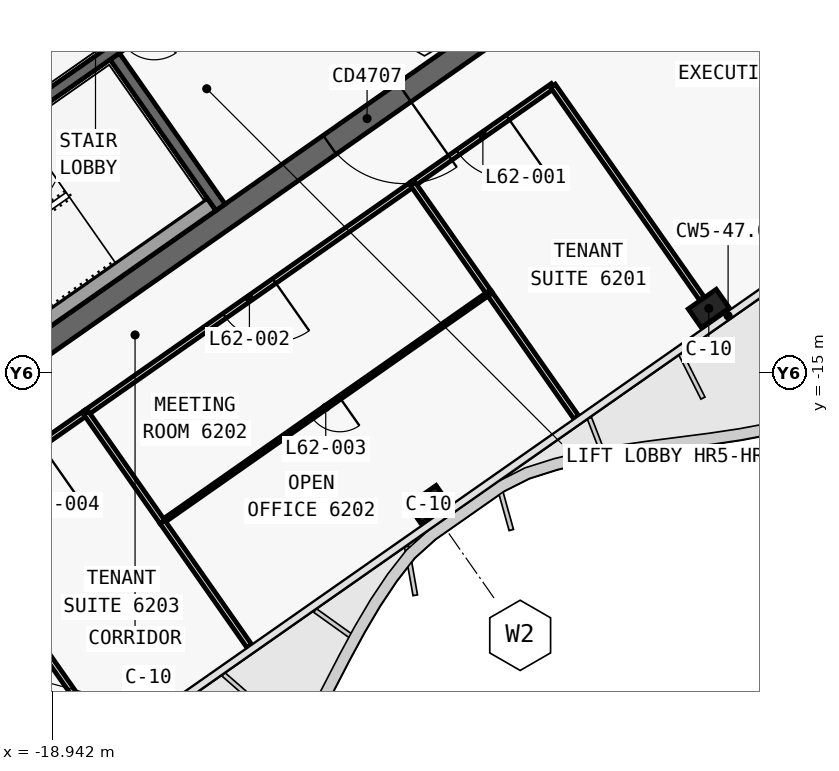
"""IFC4 building model, lengths in metres.
Left out: names, types, materials, properties, quantities, classifications, styles, units other than length and angle.
Written with IfcOpenShell. Run it as: python <this file> out.ifc"""

import sys

from ifc_helpers import new_model, si_unit, direction, frame, frame_2d, origin, origin_2d, place, context, subcontext, project, spatial, polyline, rectangle, outline, extrude, element, fill, save


model = new_model("IFC4")
c1 = context("Model", 3, precision=1e-05, world=origin(), true_north=direction((0.0, 1.0)))
c2 = subcontext(c1, "Body", "Model", "MODEL_VIEW")
j1 = project(units=[si_unit("LENGTHUNIT", "METRE"), si_unit("PLANEANGLEUNIT", "RADIAN")], contexts=[c1])
p1 = place(None, origin())
s1 = spatial("IfcSite", under=j1, at=p1, CompositionType="ELEMENT")
p2 = place(p1, origin())
s2 = spatial("IfcBuilding", under=s1, at=p2, CompositionType="ELEMENT")
p3 = place(p2, frame((0.0, 0.0, 264.4)))
s3 = spatial("IfcBuildingStorey", under=s2, at=p3, CompositionType="ELEMENT", Elevation=264.4)
p4 = place(p3, frame((-0.028, 12.066, 0.0), z_axis=(0.0, 0.0, 1.0), x_axis=(-0.819151382952, -0.573577380837, 0.0)))
e1 = element("IfcWall", 1, at=p4, inside=s3, PredefinedType="SHEAR", context=c2, shape_type="SweptSolid", body=[
    extrude(outline(polyline([(33.898, 0.3), (0.42, 0.3), (0.0, -0.3), (33.898, -0.3), (33.898, 0.3)])), origin(), (0.0, 0.0, 1.0), 3.9),
])
p5 = place(p3, frame((-0.028, -0.874, 0.0), z_axis=(0.0, 0.0, 1.0), x_axis=(-0.819150035022, -0.573579305871, 0.0)))
e2 = element("IfcWall", 2, at=p5, inside=s3, PredefinedType="SHEAR", context=c2, shape_type="SweptSolid", body=[
    extrude(outline(polyline([(26.476, 0.3), (0.42, 0.3), (0.0, -0.3), (26.476, -0.3), (26.476, 0.3)])), origin(), (0.0, 0.0, 1.0), 3.9),
])
p6 = place(p5, frame((2.976, 0.0, 0.0)))
e3 = element("IfcOpeningElement", 3, at=p6, cuts=e2, PredefinedType="OPENING", context=c2, shape_type="SweptSolid", body=[
    extrude(rectangle(XDim=2.4, YDim=2.1, at=frame_2d((1.2, 1.05))), frame((0.0, 0.31, 0.0), z_axis=(0.0, -1.0, 0.0), x_axis=(1.0, 0.0, 0.0)), (0.0, 0.0, 1.0), 0.62),
])
p7 = place(p5, frame((11.776, 0.0, 0.0)))
e4 = element("IfcOpeningElement", 4, at=p7, cuts=e2, PredefinedType="OPENING", context=c2, shape_type="SweptSolid", body=[
    extrude(rectangle(XDim=2.4, YDim=2.1, at=frame_2d((1.2, 1.05))), frame((0.0, 0.31, 0.0), z_axis=(0.0, -1.0, 0.0), x_axis=(1.0, 0.0, 0.0)), (0.0, 0.0, 1.0), 0.62),
])
p8 = place(p3, frame((-14.515, -10.652, 0.0), z_axis=(0.0, 0.0, 1.0), x_axis=(-0.573560315113, 0.819163332265, 0.0)))
e5 = element("IfcWall", 5, at=p8, inside=s3, PredefinedType="SHEAR", context=c2, shape_type="SweptSolid", body=[
    extrude(outline(polyline([(4.85, 0.15), (0.0, 0.15), (0.0, -0.15), (4.85, -0.15), (4.85, 0.15)])), origin(), (0.0, 0.0, 1.0), 3.9),
])
p9 = place(p3, frame((-2.638, 3.768, 0.0), z_axis=(0.0, 0.0, 1.0), x_axis=(-0.819155014212, -0.573572194837, 0.0)))
e6 = element("IfcWall", 6, at=p9, inside=s3, PredefinedType="SHEAR", context=c2, shape_type="SweptSolid", body=[
    extrude(outline(polyline([(26.4, 0.15), (0.0, 0.15), (0.0, -0.15), (26.4, -0.15), (26.4, 0.15)])), origin(), (0.0, 0.0, 1.0), 3.9),
])
p10 = place(p9, frame((1.169, 0.0, 0.0)))
e7 = element("IfcOpeningElement", 7, at=p10, cuts=e6, PredefinedType="OPENING", context=c2, shape_type="SweptSolid", body=[
    extrude(rectangle(XDim=1.1, YDim=2.1, at=frame_2d((0.55, 1.05))), frame((0.0, 0.16, 0.0), z_axis=(0.0, -1.0, 0.0), x_axis=(1.0, 0.0, 0.0)), (0.0, 0.0, 1.0), 0.32),
])
p11 = place(p9, frame((3.206, 0.0, 0.0)))
e8 = element("IfcOpeningElement", 8, at=p11, cuts=e6, PredefinedType="OPENING", context=c2, shape_type="SweptSolid", body=[
    extrude(rectangle(XDim=1.1, YDim=2.1, at=frame_2d((0.55, 1.05))), frame((0.0, 0.16, 0.0), z_axis=(0.0, -1.0, 0.0), x_axis=(1.0, 0.0, 0.0)), (0.0, 0.0, 1.0), 0.32),
])
p12 = place(p9, frame((5.244, 0.0, 0.0)))
e9 = element("IfcOpeningElement", 9, at=p12, cuts=e6, PredefinedType="OPENING", context=c2, shape_type="SweptSolid", body=[
    extrude(rectangle(XDim=1.1, YDim=2.1, at=frame_2d((0.55, 1.05))), frame((0.0, 0.16, 0.0), z_axis=(0.0, -1.0, 0.0), x_axis=(1.0, 0.0, 0.0)), (0.0, 0.0, 1.0), 0.32),
])
p13 = place(p9, frame((7.281, 0.0, 0.0)))
e10 = element("IfcOpeningElement", 10, at=p13, cuts=e6, PredefinedType="OPENING", context=c2, shape_type="SweptSolid", body=[
    extrude(rectangle(XDim=1.1, YDim=2.1, at=frame_2d((0.55, 1.05))), frame((0.0, 0.16, 0.0), z_axis=(0.0, -1.0, 0.0), x_axis=(1.0, 0.0, 0.0)), (0.0, 0.0, 1.0), 0.32),
])
p14 = place(p9, frame((9.688, 0.0, 0.0)))
e11 = element("IfcOpeningElement", 11, at=p14, cuts=e6, PredefinedType="OPENING", context=c2, shape_type="SweptSolid", body=[
    extrude(rectangle(XDim=1.1, YDim=2.1, at=frame_2d((0.55, 1.05))), frame((0.0, 0.16, 0.0), z_axis=(0.0, -1.0, 0.0), x_axis=(1.0, 0.0, 0.0)), (0.0, 0.0, 1.0), 0.32),
])
p15 = place(p9, frame((11.863, 0.0, 0.0)))
e12 = element("IfcOpeningElement", 12, at=p15, cuts=e6, PredefinedType="OPENING", context=c2, shape_type="SweptSolid", body=[
    extrude(rectangle(XDim=1.1, YDim=2.1, at=frame_2d((0.55, 1.05))), frame((0.0, 0.16, 0.0), z_axis=(0.0, -1.0, 0.0), x_axis=(1.0, 0.0, 0.0)), (0.0, 0.0, 1.0), 0.32),
])
p16 = place(p9, frame((14.552, 0.0, 0.0)))
e13 = element("IfcOpeningElement", 13, at=p16, cuts=e6, PredefinedType="OPENING", context=c2, shape_type="SweptSolid", body=[
    extrude(rectangle(XDim=1.0, YDim=2.1, at=frame_2d((0.5, 1.05))), frame((0.0, 0.16, 0.0), z_axis=(0.0, -1.0, 0.0), x_axis=(1.0, 0.0, 0.0)), (0.0, 0.0, 1.0), 0.32),
])
p17 = place(p9, frame((16.627, 0.0, 0.0)))
e14 = element("IfcOpeningElement", 14, at=p17, cuts=e6, PredefinedType="OPENING", context=c2, shape_type="SweptSolid", body=[
    extrude(rectangle(XDim=1.0, YDim=2.1, at=frame_2d((0.5, 1.05))), frame((0.0, 0.16, 0.0), z_axis=(0.0, -1.0, 0.0), x_axis=(1.0, 0.0, 0.0)), (0.0, 0.0, 1.0), 0.32),
])
for number, where, z_axis, x_axis in (
    (15, (-1.665, -13.313, 0.0), (0.0, 0.0, 1.0), (-0.819, -0.574, 0.0)),
    (16, (-9.038, -18.475, 0.0), (0.0, 0.0, 1.0), (-0.819, -0.574, 0.0)),
    (17, (-16.41, -23.637, 0.0), (0.0, 0.0, 1.0), (-0.819, -0.574, 0.0)),
):
    element("IfcColumn", number, at=place(p3, frame(where, z_axis=z_axis, x_axis=x_axis)), inside=s3, PredefinedType="COLUMN", context=c2, shape_type="SweptSolid", body=[
        extrude(rectangle(XDim=0.9, YDim=0.6, at=origin_2d()), origin(), (0.0, 0.0, 1.0), 3.9),
    ])
p18 = place(p3, frame((-14.753, -10.574, 0.0), z_axis=(0.0, 0.0, 1.0), x_axis=(-0.819158229677, -0.573567602601, 0.0)))
e18 = element("IfcWall", 18, at=p18, inside=s3, PredefinedType="SOLIDWALL", context=c2, shape_type="SweptSolid", body=[
    extrude(rectangle(XDim=8.25, YDim=0.4, at=frame_2d((4.125, 0.0))), origin(), (0.0, 0.0, 1.0), 3.62),
])
p19 = place(p3, frame((-5.766, -7.456, 0.0), z_axis=(0.0, 0.0, 1.0), x_axis=(-0.819142740634, -0.573589723117, 0.0)))
e19 = element("IfcWall", 19, at=p19, inside=s3, PredefinedType="PARTITIONING", context=c2, shape_type="SweptSolid", body=[
    extrude(rectangle(XDim=4.502, YDim=0.15, at=frame_2d((2.251, 0.0))), origin(), (0.0, 0.0, 1.0), 3.05),
])
p20 = place(p19, frame((1.451, 0.0, 0.0)))
e20 = element("IfcOpeningElement", 20, at=p20, cuts=e19, PredefinedType="OPENING", context=c2, shape_type="SweptSolid", body=[
    extrude(rectangle(XDim=1.6, YDim=2.1, at=frame_2d((0.8, 1.05))), frame((0.0, 0.085, 0.0), z_axis=(0.0, -1.0, 0.0), x_axis=(1.0, 0.0, 0.0)), (0.0, 0.0, 1.0), 0.17),
])
p21 = place(p3, frame((-9.451, -10.036, 0.0), z_axis=(0.0, 0.0, 1.0), x_axis=(-0.819164214721, -0.57355905478, 0.0)))
e21 = element("IfcWall", 21, at=p21, inside=s3, PredefinedType="PARTITIONING", context=c2, shape_type="SweptSolid", body=[
    extrude(rectangle(XDim=10.504, YDim=0.15, at=frame_2d((5.252, 0.0))), origin(), (0.0, 0.0, 1.0), 3.05),
])
p22 = place(p21, frame((4.452, 0.0, 0.0)))
e22 = element("IfcOpeningElement", 22, at=p22, cuts=e21, PredefinedType="OPENING", context=c2, shape_type="SweptSolid", body=[
    extrude(rectangle(XDim=1.6, YDim=2.1, at=frame_2d((0.8, 1.05))), frame((0.0, 0.085, 0.0), z_axis=(0.0, -1.0, 0.0), x_axis=(1.0, 0.0, 0.0)), (0.0, 0.0, 1.0), 0.17),
])
p23 = place(p3, frame((-18.052, -16.058, 0.0), z_axis=(0.0, 0.0, 1.0), x_axis=(-0.819165703328, -0.573556928727, 0.0)))
e23 = element("IfcWall", 23, at=p23, inside=s3, PredefinedType="PARTITIONING", context=c2, shape_type="SweptSolid", body=[
    extrude(rectangle(XDim=4.504, YDim=0.15, at=frame_2d((2.252, 0.0))), origin(), (0.0, 0.0, 1.0), 3.05),
])
p24 = place(p23, frame((1.452, 0.0, 0.0)))
e24 = element("IfcOpeningElement", 24, at=p24, cuts=e23, PredefinedType="OPENING", context=c2, shape_type="SweptSolid", body=[
    extrude(rectangle(XDim=1.6, YDim=2.1, at=frame_2d((0.8, 1.05))), frame((0.0, 0.085, 0.0), z_axis=(0.0, -1.0, 0.0), x_axis=(1.0, 0.0, 0.0)), (0.0, 0.0, 1.0), 0.17),
])
p25 = place(p3, frame((-1.849, -13.051, 0.0), z_axis=(0.0, 0.0, 1.0), x_axis=(-0.57357985571, 0.819149650018, 0.0)))
e25 = element("IfcWall", 25, at=p25, inside=s3, PredefinedType="PARTITIONING", context=c2, shape_type="SweptSolid", body=[
    extrude(rectangle(XDim=6.832, YDim=0.15, at=frame_2d((3.416, 0.0))), origin(), (0.0, 0.0, 1.0), 3.05),
])
p26 = place(p3, frame((-5.151, -16.18, 0.0), z_axis=(0.0, 0.0, 1.0), x_axis=(-0.573593387921, 0.81914017441, 0.0)))
e26 = element("IfcWall", 26, at=p26, inside=s3, PredefinedType="PARTITIONING", context=c2, shape_type="SweptSolid", body=[
    extrude(rectangle(XDim=4.001, YDim=0.15, at=frame_2d((2.0, 0.0))), origin(), (0.0, 0.0, 1.0), 3.0),
])
p27 = place(p3, frame((-7.444, -12.906, 0.0), z_axis=(0.0, 0.0, 1.0), x_axis=(-0.573555919535, 0.819166409935, 0.0)))
e27 = element("IfcWall", 27, at=p27, inside=s3, PredefinedType="PARTITIONING", context=c2, shape_type="SweptSolid", body=[
    extrude(rectangle(XDim=3.502, YDim=0.15, at=frame_2d((1.751, 0.0))), origin(), (0.0, 0.0, 1.0), 3.62),
])
p28 = place(p3, frame((-7.444, -12.905, 0.0), z_axis=(0.0, 0.0, 1.0), x_axis=(-0.819155448096, -0.573571575181, 0.0)))
e28 = element("IfcWall", 28, at=p28, inside=s3, PredefinedType="PARTITIONING", context=c2, shape_type="SweptSolid", body=[
    extrude(rectangle(XDim=10.5, YDim=0.1, at=frame_2d((5.25, 0.0))), origin(), (0.0, 0.0, 1.0), 3.05),
])
p29 = place(p28, frame((4.8, 0.0, 0.0)))
e29 = element("IfcOpeningElement", 29, at=p29, cuts=e28, PredefinedType="OPENING", context=c2, shape_type="SweptSolid", body=[
    extrude(rectangle(XDim=0.9, YDim=2.1, at=frame_2d((0.45, 1.05))), frame((0.0, 0.06, 0.0), z_axis=(0.0, -1.0, 0.0), x_axis=(1.0, 0.0, 0.0)), (0.0, 0.0, 1.0), 0.12),
])
p30 = place(p3, frame((-13.752, -22.203, 0.0), z_axis=(0.0, 0.0, 1.0), x_axis=(-0.573560675104, 0.819163080207, 0.0)))
e30 = element("IfcWall", 30, at=p30, inside=s3, PredefinedType="PARTITIONING", context=c2, shape_type="SweptSolid", body=[
    extrude(rectangle(XDim=3.999, YDim=0.15, at=frame_2d((2.0, 0.0))), origin(), (0.0, 0.0, 1.0), 3.0),
])
p31 = place(p3, frame((-16.046, -18.927, 0.0), z_axis=(0.0, 0.0, 1.0), x_axis=(-0.573598101901, 0.81913687348, 0.0)))
e31 = element("IfcWall", 31, at=p31, inside=s3, PredefinedType="PARTITIONING", context=c2, shape_type="SweptSolid", body=[
    extrude(rectangle(XDim=3.5, YDim=0.15, at=frame_2d((1.75, 0.0))), origin(), (0.0, 0.0, 1.0), 3.62),
])
p32 = place(p3, frame((-17.438, -24.784, 0.0), z_axis=(0.0, 0.0, 1.0), x_axis=(-0.573575945067, 0.81915238829, 0.0)))
e32 = element("IfcWall", 32, at=p32, inside=s3, PredefinedType="PARTITIONING", context=c2, shape_type="SweptSolid", body=[
    extrude(rectangle(XDim=7.5, YDim=0.15, at=frame_2d((3.75, 0.0))), origin(), (0.0, 0.0, 1.0), 3.0),
])
p33 = place(p7, origin())
e33 = element("IfcDoor", 33, at=p33, inside=s3, OperationType="DOUBLE_DOOR_SINGLE_SWING", PredefinedType="DOOR", context=c2, shape_type="SweptSolid", body=[
    extrude(rectangle(XDim=2.4, YDim=2.1, at=frame_2d((1.2, 1.05))), frame((0.0, 0.025, 0.0), z_axis=(0.0, -1.0, 0.0), x_axis=(1.0, 0.0, 0.0)), (0.0, 0.0, 1.0), 0.05),
])
fill(e4, e33)
p34 = place(p20, origin())
e34 = element("IfcDoor", 34, at=p34, inside=s3, OperationType="DOUBLE_DOOR_SINGLE_SWING", PredefinedType="DOOR", context=c2, shape_type="SweptSolid", body=[
    extrude(rectangle(XDim=1.6, YDim=2.1, at=frame_2d((0.8, 1.05))), frame((0.0, 0.025, 0.0), z_axis=(0.0, -1.0, 0.0), x_axis=(1.0, 0.0, 0.0)), (0.0, 0.0, 1.0), 0.05),
])
fill(e20, e34)
p35 = place(p22, origin())
e35 = element("IfcDoor", 35, at=p35, inside=s3, OperationType="DOUBLE_DOOR_SINGLE_SWING", PredefinedType="DOOR", context=c2, shape_type="SweptSolid", body=[
    extrude(rectangle(XDim=1.6, YDim=2.1, at=frame_2d((0.8, 1.05))), frame((0.0, 0.025, 0.0), z_axis=(0.0, -1.0, 0.0), x_axis=(1.0, 0.0, 0.0)), (0.0, 0.0, 1.0), 0.05),
])
fill(e22, e35)
p36 = place(p29, origin())
e36 = element("IfcDoor", 36, at=p36, inside=s3, OperationType="SINGLE_SWING_RIGHT", PredefinedType="DOOR", context=c2, shape_type="SweptSolid", body=[
    extrude(rectangle(XDim=0.9, YDim=2.1, at=frame_2d((0.45, 1.05))), frame((0.0, 0.025, 0.0), z_axis=(0.0, -1.0, 0.0), x_axis=(1.0, 0.0, 0.0)), (0.0, 0.0, 1.0), 0.05),
])
fill(e29, e36)
save(model, sys.argv[1])
